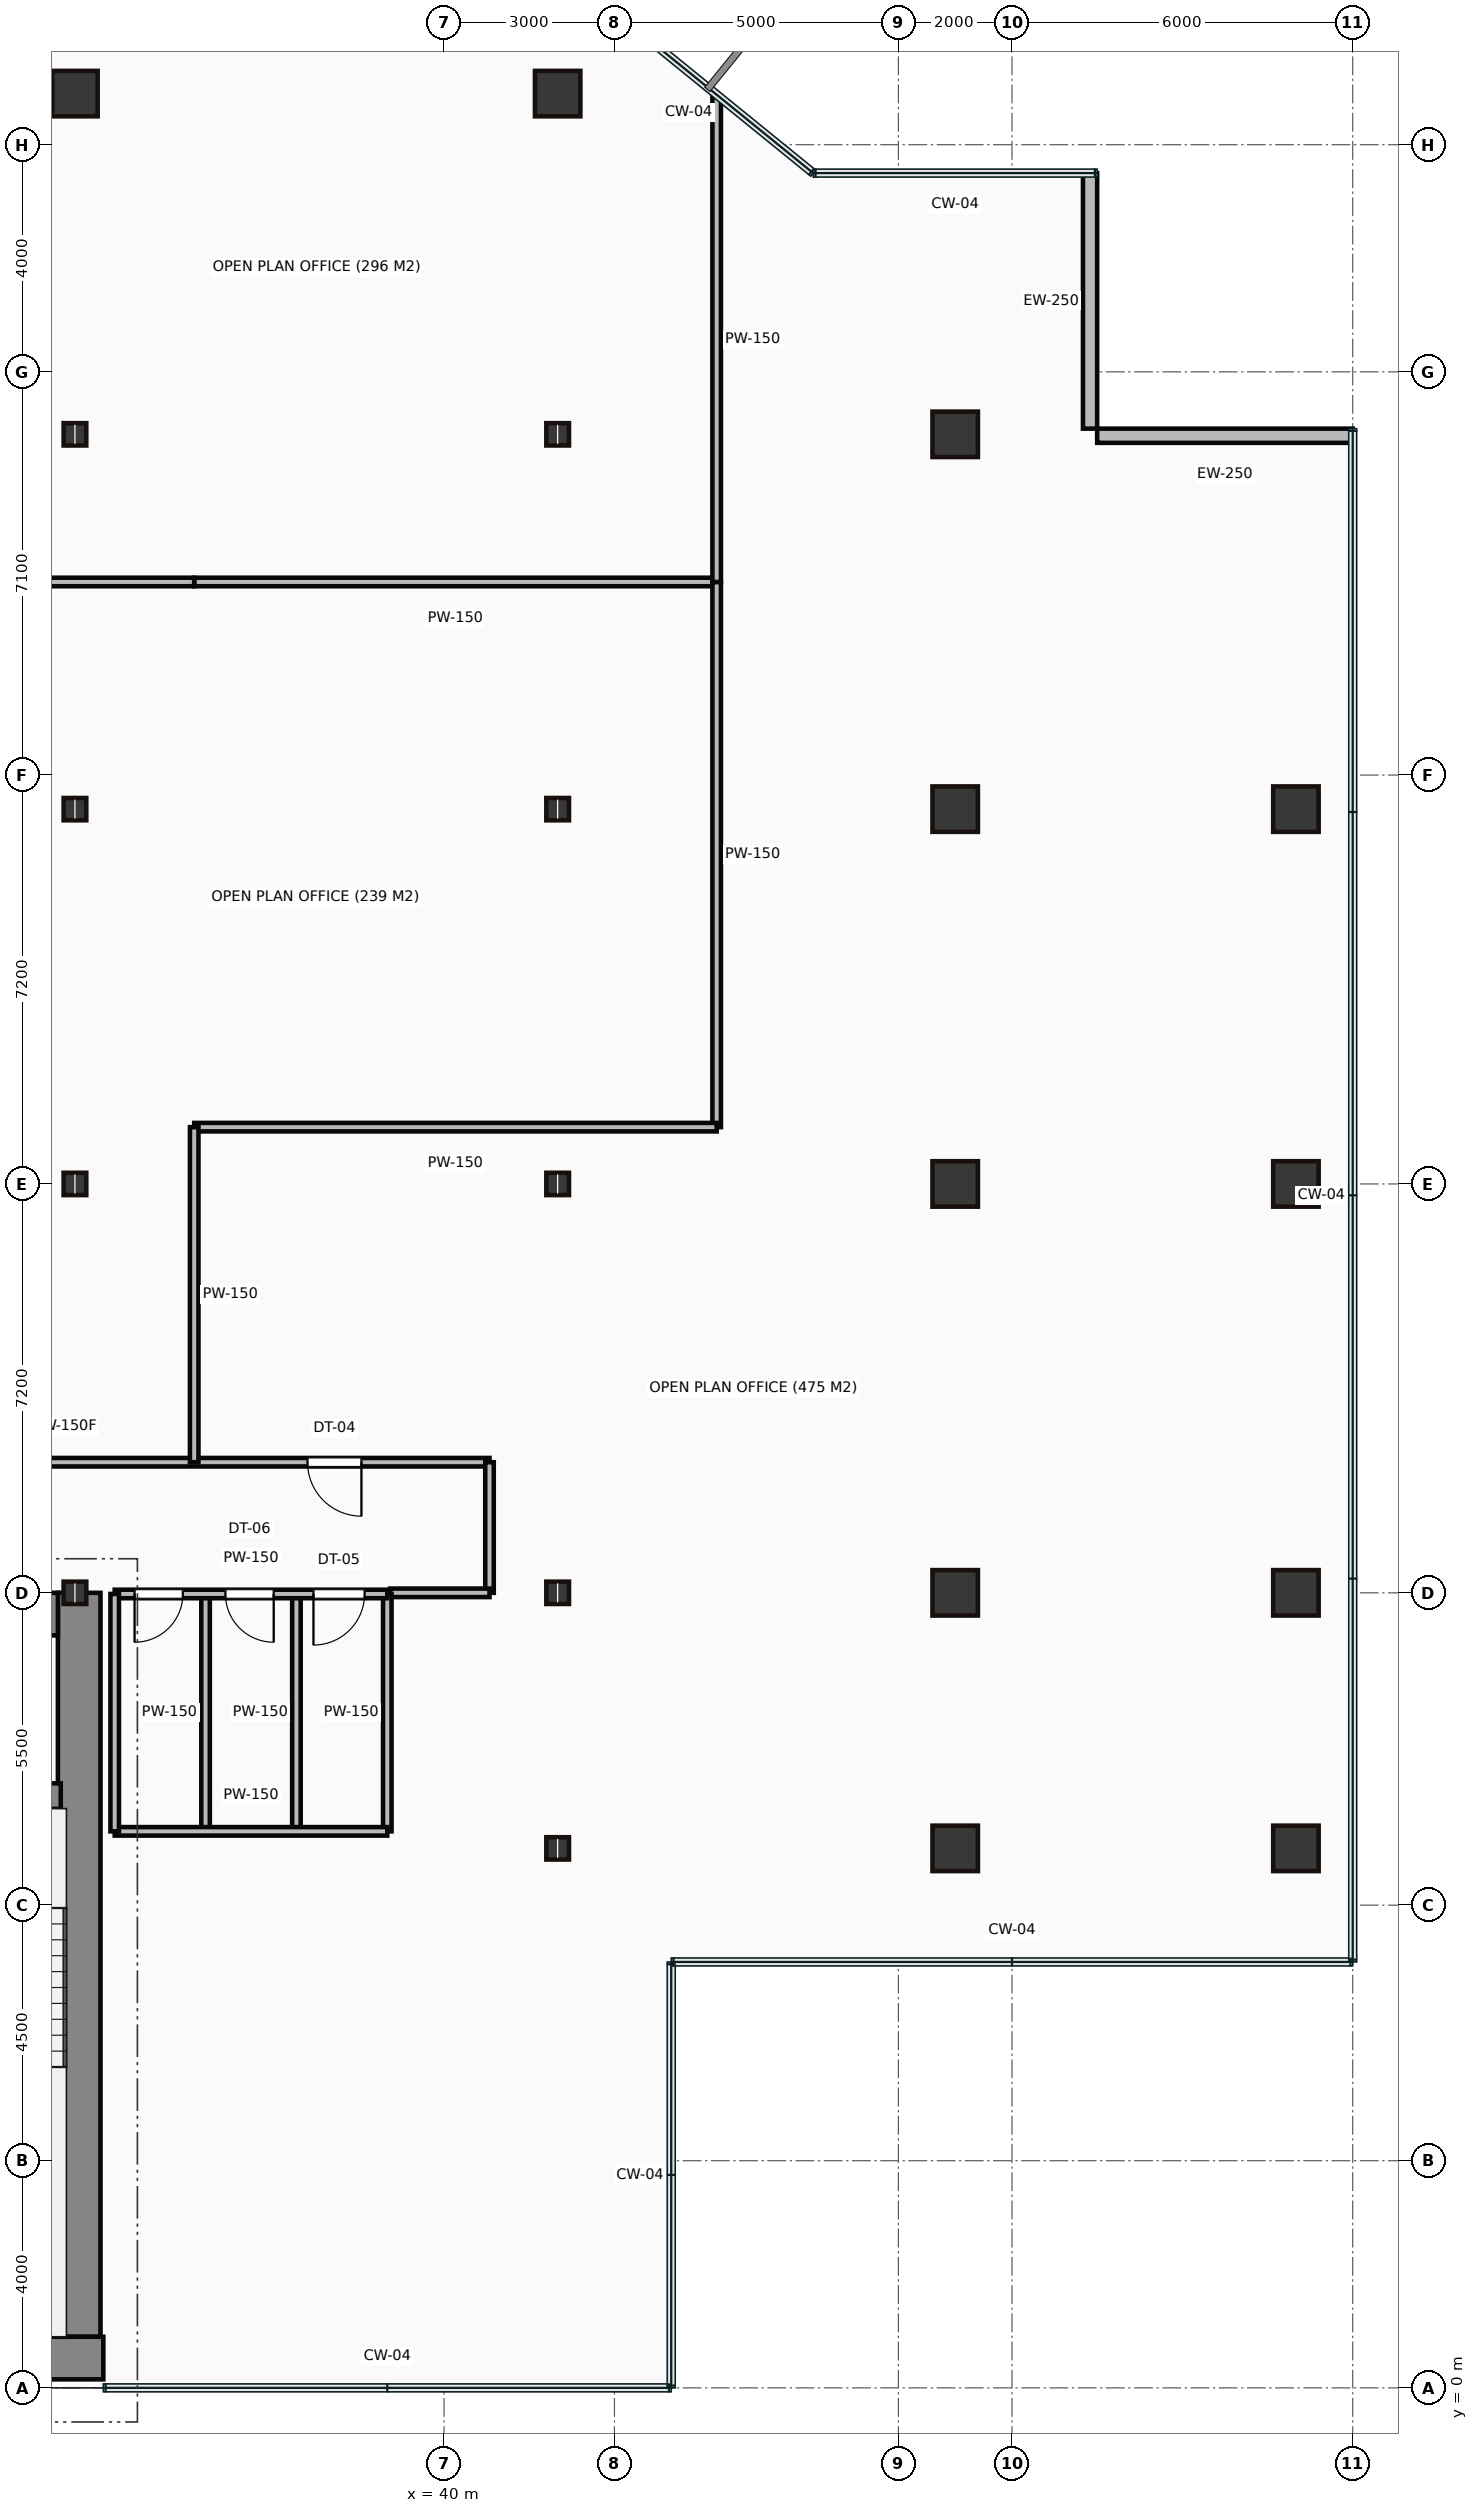
"""IFC4 building model, lengths in metres.
Left out: names, types, materials, properties, quantities, classifications, styles, units other than length and angle.
Written with IfcOpenShell. Run it as: python <this file> out.ifc"""

import sys

from ifc_helpers import new_model, si_unit, direction, frame, frame_2d, origin, origin_2d, place, context, subcontext, project, spatial, rectangle, hollow_rectangle, i_section, extrude, source, transform, mapped, element, fill, save


model = new_model("IFC4")
c1 = context("Model", 3, precision=1e-05, world=origin(), true_north=direction((0.0, 1.0)))
c2 = subcontext(c1, "Body", "Model", "MODEL_VIEW")
j1 = project(units=[si_unit("LENGTHUNIT", "METRE"), si_unit("PLANEANGLEUNIT", "RADIAN")], contexts=[c1])
p1 = place(None, origin())
s1 = spatial("IfcSite", under=j1, at=p1, CompositionType="ELEMENT")
p2 = place(p1, origin())
s2 = spatial("IfcBuilding", under=s1, at=p2, CompositionType="ELEMENT")
p3 = place(p2, frame((0.0, 0.0, 132.45)))
s3 = spatial("IfcBuildingStorey", under=s2, at=p3, CompositionType="ELEMENT", Elevation=132.45)
m1 = source(origin(), c2, "Body", "SweptSolid", [
    extrude(rectangle(XDim=29.5, YDim=0.75, at=frame_2d((14.75, 0.0))), origin(), (0.0, 0.0, 1.0), 3.65),
])
p4 = place(p3, frame((4.5, 0.525, 0.0), z_axis=(0.0, 0.0, 1.0), x_axis=(1.0, 0.0, 0.0)))
e1 = element("IfcWall", 1, at=p4, inside=s3, PredefinedType="SHEAR", context=c2, shape_type="MappedRepresentation", body=[
    mapped(m1, transform((0.0, 0.0, 0.0))),
])
m2 = source(origin(), c2, "Body", "SweptSolid", [
    extrude(rectangle(XDim=13.1, YDim=0.75, at=frame_2d((6.55, 0.0))), origin(), (0.0, 0.0, 1.0), 3.65),
])
p5 = place(p3, frame((33.575, 0.9, 0.0), z_axis=(0.0, 0.0, 1.0), x_axis=(0.0, 1.0, 0.0)))
e2 = element("IfcWall", 2, at=p5, inside=s3, PredefinedType="SHEAR", context=c2, shape_type="MappedRepresentation", body=[
    mapped(m2, transform((0.0, 0.0, 0.0))),
])
m3 = source(origin(), c2, "Body", "SweptSolid", [
    extrude(rectangle(XDim=12.6, YDim=0.75, at=frame_2d((6.3, 0.0))), origin(), (0.0, 0.0, 1.0), 3.65),
])
p6 = place(p3, frame((20.6, 13.625, 0.0), z_axis=(0.0, 0.0, 1.0), x_axis=(1.0, 0.0, 0.0)))
e3 = element("IfcWall", 3, at=p6, inside=s3, PredefinedType="SHEAR", context=c2, shape_type="MappedRepresentation", body=[
    mapped(m3, transform((0.0, 0.0, 0.0))),
])
p7 = place(p6, frame((9.25, 0.0, 0.0)))
e4 = element("IfcOpeningElement", 4, at=p7, cuts=e3, PredefinedType="OPENING", context=c2, shape_type="SweptSolid", body=[
    extrude(rectangle(XDim=1.1, YDim=2.15, at=frame_2d((0.55, 1.075))), frame((0.0, 0.385, 0.0), z_axis=(0.0, -1.0, 0.0), x_axis=(1.0, 0.0, 0.0)), (0.0, 0.0, 1.0), 0.77),
])
m4 = source(origin(), c2, "Body", "SweptSolid", [
    extrude(rectangle(XDim=3.39, YDim=0.45, at=frame_2d((1.695, 0.0))), origin(), (0.0, 0.0, 1.0), 3.65),
])
p8 = place(p3, frame((29.86, 10.42, 0.0), z_axis=(0.0, 0.0, 1.0), x_axis=(1.0, 0.0, 0.0)))
e5 = element("IfcWall", 5, at=p8, inside=s3, PredefinedType="SHEAR", context=c2, shape_type="MappedRepresentation", body=[
    mapped(m4, transform((0.0, 0.0, 0.0))),
])
p9 = place(p8, frame((1.1, 0.0, 0.0)))
e6 = element("IfcOpeningElement", 6, at=p9, cuts=e5, PredefinedType="OPENING", context=c2, shape_type="SweptSolid", body=[
    extrude(rectangle(XDim=1.1, YDim=2.15, at=frame_2d((0.55, 1.075))), frame((0.0, 0.235, 0.0), z_axis=(0.0, -1.0, 0.0), x_axis=(1.0, 0.0, 0.0)), (0.0, 0.0, 1.0), 0.47),
])
m5 = source(origin(), c2, "Body", "SweptSolid", [
    extrude(i_section(OverallWidth=0.399, OverallDepth=0.393, WebThickness=0.023, FlangeThickness=0.037, at=origin_2d()), origin(), (0.0, 0.0, 1.0), 3.65),
])
for number, where, z_axis, x_axis in (
    (7, (33.5, 14.0, 0.0), (0.0, 0.0, 1.0), (1.0, 0.0, 0.0)),
    (8, (33.5, 21.2, 0.0), (0.0, 0.0, 1.0), (1.0, 0.0, 0.0)),
    (9, (33.5, 27.8, 0.0), (0.0, 0.0, 1.0), (1.0, 0.0, 0.0)),
    (10, (33.5, 34.4, 0.0), (0.0, 0.0, 1.0), (1.0, 0.0, 0.0)),
):
    element("IfcColumn", number, at=place(p3, frame(where, z_axis=z_axis, x_axis=x_axis)), inside=s3, PredefinedType="COLUMN", context=c2, shape_type="MappedRepresentation", body=[
        mapped(m5, transform((0.0, 0.0, 0.0))),
    ])
m6 = source(origin(), c2, "Body", "SweptSolid", [
    extrude(hollow_rectangle(XDim=0.8, YDim=0.8, WallThickness=0.04, at=origin_2d()), origin(), (0.0, 0.0, 1.0), 3.65),
])
p10 = place(p3, frame((33.5, 40.4, 0.0), z_axis=(0.0, 0.0, 1.0), x_axis=(1.0, 0.0, 0.0)))
e11 = element("IfcColumn", 11, at=p10, inside=s3, PredefinedType="COLUMN", context=c2, shape_type="MappedRepresentation", body=[
    mapped(m6, transform((0.0, 0.0, 0.0))),
])
for number, where, z_axis, x_axis in (
    (12, (42.0, 9.5, 0.0), (0.0, 0.0, 1.0), (1.0, 0.0, 0.0)),
    (13, (42.0, 14.0, 0.0), (0.0, 0.0, 1.0), (1.0, 0.0, 0.0)),
    (14, (42.0, 21.2, 0.0), (0.0, 0.0, 1.0), (1.0, 0.0, 0.0)),
    (15, (42.0, 27.8, 0.0), (0.0, 0.0, 1.0), (1.0, 0.0, 0.0)),
    (16, (42.0, 34.4, 0.0), (0.0, 0.0, 1.0), (1.0, 0.0, 0.0)),
):
    element("IfcColumn", number, at=place(p3, frame(where, z_axis=z_axis, x_axis=x_axis)), inside=s3, PredefinedType="COLUMN", context=c2, shape_type="MappedRepresentation", body=[
        mapped(m5, transform((0.0, 0.0, 0.0))),
    ])
for number, where, z_axis, x_axis in (
    (17, (42.0, 40.4, 0.0), (0.0, 0.0, 1.0), (1.0, 0.0, 0.0)),
    (18, (49.0, 9.5, 0.0), (0.0, 0.0, 1.0), (1.0, 0.0, 0.0)),
    (19, (49.0, 14.0, 0.0), (0.0, 0.0, 1.0), (1.0, 0.0, 0.0)),
    (20, (49.0, 21.2, 0.0), (0.0, 0.0, 1.0), (1.0, 0.0, 0.0)),
    (21, (49.0, 27.8, 0.0), (0.0, 0.0, 1.0), (1.0, 0.0, 0.0)),
    (22, (49.0, 34.4, 0.0), (0.0, 0.0, 1.0), (1.0, 0.0, 0.0)),
    (23, (55.0, 9.5, 0.0), (0.0, 0.0, 1.0), (1.0, 0.0, 0.0)),
    (24, (55.0, 14.0, 0.0), (0.0, 0.0, 1.0), (1.0, 0.0, 0.0)),
    (25, (55.0, 21.2, 0.0), (0.0, 0.0, 1.0), (1.0, 0.0, 0.0)),
    (26, (55.0, 27.8, 0.0), (0.0, 0.0, 1.0), (1.0, 0.0, 0.0)),
):
    element("IfcColumn", number, at=place(p3, frame(where, z_axis=z_axis, x_axis=x_axis)), inside=s3, PredefinedType="COLUMN", context=c2, shape_type="MappedRepresentation", body=[
        mapped(m6, transform((0.0, 0.0, 0.0))),
    ])
m7 = source(origin(), c2, "Body", "SweptSolid", [
    extrude(rectangle(XDim=4.5, YDim=0.25, at=frame_2d((2.25, 0.0))), origin(), (0.0, 0.0, 1.0), 3.35),
])
for number, where, z_axis, x_axis in (
    (27, (56.0, 34.375, 0.0), (0.0, 0.0, 1.0), (-1.0, 0.0, 0.0)),
    (28, (51.375, 34.5, 0.0), (0.0, 0.0, 1.0), (0.0, 1.0, 0.0)),
):
    element("IfcWall", number, at=place(p3, frame(where, z_axis=z_axis, x_axis=x_axis)), inside=s3, PredefinedType="STANDARD", context=c2, shape_type="MappedRepresentation", body=[
        mapped(m7, transform((0.0, 0.0, 0.0))),
    ])
m8 = source(origin(), c2, "Body", "SweptSolid", [
    extrude(rectangle(XDim=4.8, YDim=0.15, at=frame_2d((2.4, 0.0))), origin(), (0.0, 0.0, 1.0), 2.652),
])
p11 = place(p3, frame((34.2, 13.98, 0.0), z_axis=(0.0, 0.0, 1.0), x_axis=(1.0, 0.0, 0.0)))
e29 = element("IfcWall", 29, at=p11, inside=s3, PredefinedType="PARTITIONING", context=c2, shape_type="MappedRepresentation", body=[
    mapped(m8, transform((0.0, 0.0, 0.0))),
])
p12 = place(p11, frame((0.35, 0.0, 0.0)))
e30 = element("IfcOpeningElement", 30, at=p12, cuts=e29, PredefinedType="OPENING", context=c2, shape_type="SweptSolid", body=[
    extrude(rectangle(XDim=0.85, YDim=2.1, at=frame_2d((0.425, 1.05))), frame((0.0, 0.085, 0.0), z_axis=(0.0, -1.0, 0.0), x_axis=(1.0, 0.0, 0.0)), (0.0, 0.0, 1.0), 0.17),
])
p13 = place(p11, frame((1.95, 0.0, 0.0)))
e31 = element("IfcOpeningElement", 31, at=p13, cuts=e29, PredefinedType="OPENING", context=c2, shape_type="SweptSolid", body=[
    extrude(rectangle(XDim=0.85, YDim=2.1, at=frame_2d((0.425, 1.05))), frame((0.0, 0.085, 0.0), z_axis=(0.0, -1.0, 0.0), x_axis=(1.0, 0.0, 0.0)), (0.0, 0.0, 1.0), 0.17),
])
p14 = place(p11, frame((3.5, 0.0, 0.0)))
e32 = element("IfcOpeningElement", 32, at=p14, cuts=e29, PredefinedType="OPENING", context=c2, shape_type="SweptSolid", body=[
    extrude(rectangle(XDim=0.9, YDim=2.1, at=frame_2d((0.45, 1.05))), frame((0.0, 0.085, 0.0), z_axis=(0.0, -1.0, 0.0), x_axis=(1.0, 0.0, 0.0)), (0.0, 0.0, 1.0), 0.17),
])
m9 = source(origin(), c2, "Body", "SweptSolid", [
    extrude(rectangle(XDim=4.8, YDim=0.15, at=frame_2d((2.4, 0.0))), origin(), (0.0, 0.0, 1.0), 3.35),
])
p15 = place(p3, frame((34.2, 9.8, 0.0), z_axis=(0.0, 0.0, 1.0), x_axis=(1.0, 0.0, 0.0)))
e33 = element("IfcWall", 33, at=p15, inside=s3, PredefinedType="PARTITIONING", context=c2, shape_type="MappedRepresentation", body=[
    mapped(m9, transform((0.0, 0.0, 0.0))),
])
m10 = source(origin(), c2, "Body", "SweptSolid", [
    extrude(rectangle(XDim=4.18, YDim=0.15, at=frame_2d((2.09, 0.0))), origin(), (0.0, 0.0, 1.0), 3.35),
])
for number, where, z_axis, x_axis in (
    (34, (39.0, 9.8, 0.0), (0.0, 0.0, 1.0), (0.0, 1.0, 0.0)),
    (35, (34.2, 9.8, 0.0), (0.0, 0.0, 1.0), (0.0, 1.0, 0.0)),
    (36, (35.8, 9.8, 0.0), (0.0, 0.0, 1.0), (0.0, 1.0, 0.0)),
    (37, (37.4, 9.8, 0.0), (0.0, 0.0, 1.0), (0.0, 1.0, 0.0)),
):
    element("IfcWall", number, at=place(p3, frame(where, z_axis=z_axis, x_axis=x_axis)), inside=s3, PredefinedType="PARTITIONING", context=c2, shape_type="MappedRepresentation", body=[
        mapped(m10, transform((0.0, 0.0, 0.0))),
    ])
m11 = source(origin(), c2, "Body", "SweptSolid", [
    extrude(rectangle(XDim=14.95, YDim=0.15, at=frame_2d((7.475, 0.0))), origin(), (0.0, 0.0, 1.0), 3.35),
])
p16 = place(p3, frame((25.85, 16.3, 0.0), z_axis=(0.0, 0.0, 1.0), x_axis=(1.0, 0.0, 0.0)))
e38 = element("IfcWall", 38, at=p16, inside=s3, PredefinedType="PARTITIONING", context=c2, shape_type="MappedRepresentation", body=[
    mapped(m11, transform((0.0, 0.0, 0.0))),
])
p17 = place(p16, frame((11.745, 0.0, 0.0)))
e39 = element("IfcOpeningElement", 39, at=p17, cuts=e38, PredefinedType="OPENING", context=c2, shape_type="SweptSolid", body=[
    extrude(rectangle(XDim=0.95, YDim=2.15, at=frame_2d((0.475, 1.075))), frame((0.0, 0.085, 0.0), z_axis=(0.0, -1.0, 0.0), x_axis=(1.0, 0.0, 0.0)), (0.0, 0.0, 1.0), 0.17),
])
m12 = source(origin(), c2, "Body", "SweptSolid", [
    extrude(rectangle(XDim=2.3, YDim=0.15, at=frame_2d((1.15, 0.0))), origin(), (0.0, 0.0, 1.0), 3.35),
])
p18 = place(p3, frame((40.8, 16.3, 0.0), z_axis=(0.0, 0.0, 1.0), x_axis=(0.0, -1.0, 0.0)))
e40 = element("IfcWall", 40, at=p18, inside=s3, PredefinedType="PARTITIONING", context=c2, shape_type="MappedRepresentation", body=[
    mapped(m12, transform((0.0, 0.0, 0.0))),
])
m13 = source(origin(), c2, "Body", "SweptSolid", [
    extrude(rectangle(XDim=1.75, YDim=0.15, at=frame_2d((0.875, 0.0))), origin(), (0.0, 0.0, 1.0), 2.652),
])
p19 = place(p3, frame((40.8, 14.0, 0.0), z_axis=(0.0, 0.0, 1.0), x_axis=(-1.0, 0.0, 0.0)))
e41 = element("IfcWall", 41, at=p19, inside=s3, PredefinedType="PARTITIONING", context=c2, shape_type="MappedRepresentation", body=[
    mapped(m13, transform((0.0, 0.0, 0.0))),
])
m14 = source(origin(), c2, "Body", "SweptSolid", [
    extrude(rectangle(XDim=9.2, YDim=0.15, at=frame_2d((4.6, 0.0))), origin(), (0.0, 0.0, 1.0), 3.35),
])
p20 = place(p3, frame((44.8, 31.8, 0.0), z_axis=(0.0, 0.0, 1.0), x_axis=(-1.0, 0.0, 0.0)))
e42 = element("IfcWall", 42, at=p20, inside=s3, PredefinedType="PARTITIONING", context=c2, shape_type="MappedRepresentation", body=[
    mapped(m14, transform((0.0, 0.0, 0.0))),
])
m15 = source(origin(), c2, "Body", "SweptSolid", [
    extrude(rectangle(XDim=9.2, YDim=0.15, at=frame_2d((4.6, 0.0))), origin(), (0.0, 0.0, 1.0), 3.35),
])
p21 = place(p3, frame((35.6, 31.8, 0.0), z_axis=(0.0, 0.0, 1.0), x_axis=(-1.0, 0.0, 0.0)))
e43 = element("IfcWall", 43, at=p21, inside=s3, PredefinedType="PARTITIONING", context=c2, shape_type="MappedRepresentation", body=[
    mapped(m15, transform((0.0, 0.0, 0.0))),
])
m16 = source(origin(), c2, "Body", "SweptSolid", [
    extrude(rectangle(XDim=9.6, YDim=0.15, at=frame_2d((4.8, 0.0))), origin(), (0.0, 0.0, 1.0), 3.35),
])
p22 = place(p3, frame((44.8, 31.8, 0.0), z_axis=(0.0, 0.0, 1.0), x_axis=(0.0, -1.0, 0.0)))
e44 = element("IfcWall", 44, at=p22, inside=s3, PredefinedType="PARTITIONING", context=c2, shape_type="MappedRepresentation", body=[
    mapped(m16, transform((0.0, 0.0, 0.0))),
])
p23 = place(p3, frame((44.8, 22.2, 0.0), z_axis=(0.0, 0.0, 1.0), x_axis=(-1.0, 0.0, 0.0)))
e45 = element("IfcWall", 45, at=p23, inside=s3, PredefinedType="PARTITIONING", context=c2, shape_type="MappedRepresentation", body=[
    mapped(m14, transform((0.0, 0.0, 0.0))),
])
m17 = source(origin(), c2, "Body", "SweptSolid", [
    extrude(rectangle(XDim=5.9, YDim=0.15, at=frame_2d((2.95, 0.0))), origin(), (0.0, 0.0, 1.0), 3.35),
])
p24 = place(p3, frame((35.6, 22.2, 0.0), z_axis=(0.0, 0.0, 1.0), x_axis=(0.0, -1.0, 0.0)))
e46 = element("IfcWall", 46, at=p24, inside=s3, PredefinedType="PARTITIONING", context=c2, shape_type="MappedRepresentation", body=[
    mapped(m17, transform((0.0, 0.0, 0.0))),
])
m18 = source(origin(), c2, "Body", "SweptSolid", [
    extrude(rectangle(XDim=8.555, YDim=0.15, at=frame_2d((4.277, 0.0))), origin(), (0.0, 0.0, 1.0), 3.35),
])
p25 = place(p3, frame((44.8, 40.355, 0.0), z_axis=(0.0, 0.0, 1.0), x_axis=(0.0, -1.0, 0.0)))
e47 = element("IfcWall", 47, at=p25, inside=s3, PredefinedType="PARTITIONING", context=c2, shape_type="MappedRepresentation", body=[
    mapped(m18, transform((0.0, 0.0, 0.0))),
])
m19 = source(origin(), c2, "Body", "SweptSolid", [
    extrude(rectangle(XDim=0.85, YDim=2.1, at=frame_2d((0.425, 1.05))), frame((0.0, 0.025, 0.0), z_axis=(0.0, -1.0, 0.0), x_axis=(1.0, 0.0, 0.0)), (0.0, 0.0, 1.0), 0.05),
])
p26 = place(p12, frame((0.85, 0.0, 0.0), z_axis=(0.0, 0.0, 1.0), x_axis=(-1.0, 0.0, 0.0)))
e48 = element("IfcDoor", 48, at=p26, inside=s3, OperationType="SINGLE_SWING_LEFT", PredefinedType="DOOR", context=c2, shape_type="MappedRepresentation", body=[
    mapped(m19, transform((0.0, 0.0, 0.0))),
])
fill(e30, e48)
p27 = place(p13, frame((0.85, 0.0, 0.0), z_axis=(0.0, 0.0, 1.0), x_axis=(-1.0, 0.0, 0.0)))
e49 = element("IfcDoor", 49, at=p27, inside=s3, OperationType="SINGLE_SWING_RIGHT", PredefinedType="DOOR", context=c2, shape_type="MappedRepresentation", body=[
    mapped(m19, transform((0.0, 0.0, 0.0))),
])
fill(e31, e49)
m20 = source(origin(), c2, "Body", "SweptSolid", [
    extrude(rectangle(XDim=0.9, YDim=2.1, at=frame_2d((0.45, 1.05))), frame((0.0, 0.025, 0.0), z_axis=(0.0, -1.0, 0.0), x_axis=(1.0, 0.0, 0.0)), (0.0, 0.0, 1.0), 0.05),
])
p28 = place(p14, frame((0.9, 0.0, 0.0), z_axis=(0.0, 0.0, 1.0), x_axis=(-1.0, 0.0, 0.0)))
e50 = element("IfcDoor", 50, at=p28, inside=s3, OperationType="SINGLE_SWING_LEFT", PredefinedType="DOOR", context=c2, shape_type="MappedRepresentation", body=[
    mapped(m20, transform((0.0, 0.0, 0.0))),
])
fill(e32, e50)
m21 = source(origin(), c2, "Body", "SweptSolid", [
    extrude(rectangle(XDim=0.95, YDim=2.15, at=frame_2d((0.475, 1.075))), frame((0.0, 0.025, 0.0), z_axis=(0.0, -1.0, 0.0), x_axis=(1.0, 0.0, 0.0)), (0.0, 0.0, 1.0), 0.05),
])
p29 = place(p17, origin())
e51 = element("IfcDoor", 51, at=p29, inside=s3, OperationType="SINGLE_SWING_RIGHT", PredefinedType="DOOR", context=c2, shape_type="MappedRepresentation", body=[
    mapped(m21, transform((0.0, 0.0, 0.0))),
])
fill(e39, e51)
save(model, sys.argv[1])
